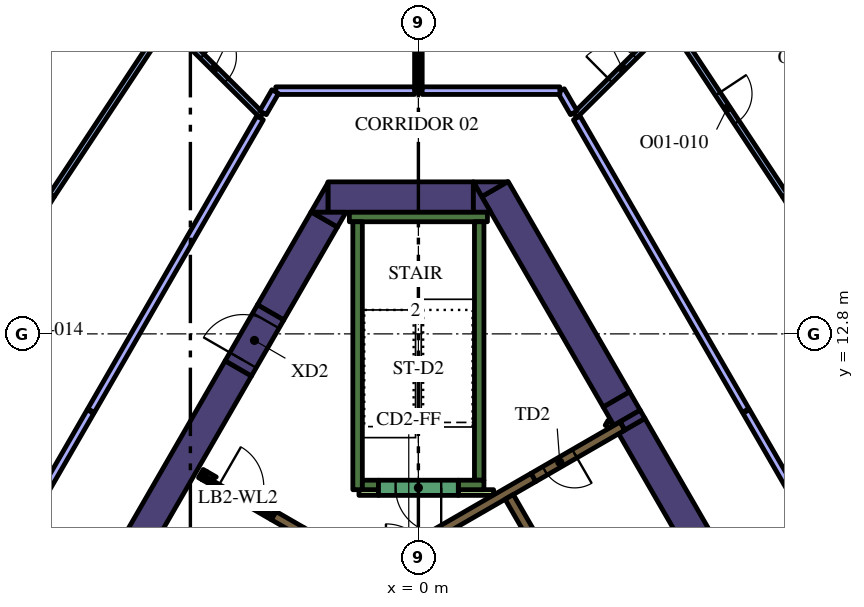
"""IFC4 building model, lengths in metres.
Left out: names, types, materials, properties, quantities, classifications, styles, units other than length and angle.
Written with IfcOpenShell. Run it as: python <this file> out.ifc"""

import sys

from ifc_helpers import new_model, si_unit, direction, frame, frame_2d, origin, place, context, subcontext, project, spatial, polyline, rectangle, outline, extrude, element, fill, save


model = new_model("IFC4")
c1 = context("Model", 3, precision=1e-05, world=origin(), true_north=direction((0.0, 1.0)))
c2 = subcontext(c1, "Body", "Model", "MODEL_VIEW")
j1 = project(units=[si_unit("LENGTHUNIT", "METRE"), si_unit("PLANEANGLEUNIT", "RADIAN")], contexts=[c1])
p1 = place(None, origin())
s1 = spatial("IfcSite", under=j1, at=p1, CompositionType="ELEMENT")
p2 = place(p1, origin())
s2 = spatial("IfcBuilding", under=s1, at=p2, CompositionType="ELEMENT")
p3 = place(p2, frame((0.0, 0.0, 145.8)))
s3 = spatial("IfcBuildingStorey", under=s2, at=p3, CompositionType="ELEMENT", Elevation=145.8)
p4 = place(p3, frame((5.489, 10.594, 0.0), z_axis=(0.0, 0.0, 1.0), x_axis=(-0.500000383388, 0.866025182435, 0.0)))
e1 = element("IfcWall", 1, at=p4, inside=s3, PredefinedType="SOLIDWALL", context=c2, shape_type="SweptSolid", body=[
    extrude(rectangle(XDim=0.558, YDim=0.8, at=frame_2d((0.279, 0.0))), origin(), (0.0, 0.0, 1.0), 4.2),
])
p5 = place(p3, frame((5.615, 10.375, 0.0), z_axis=(0.0, 0.0, 1.0), x_axis=(0.500002746266, -0.866023818221, 0.0)))
e2 = element("IfcWall", 2, at=p5, inside=s3, PredefinedType="SOLIDWALL", context=c2, shape_type="SweptSolid", body=[
    extrude(rectangle(XDim=5.328, YDim=0.8, at=frame_2d((2.664, 0.0))), origin(), (0.0, 0.0, 1.0), 4.2),
])
p6 = place(p3, origin())
e3 = element("IfcWall", 3, at=p6, inside=s3, PredefinedType="SOLIDWALL", context=c2, shape_type="SweptSolid", body=[
    extrude(outline(polyline([(5.432, 10.272), (5.308, 10.487), (5.836, 10.792), (5.96, 10.577), (5.432, 10.272)])), origin(), (0.0, 0.0, 1.0), 4.2),
])
p7 = place(p3, frame((5.209, 11.078, 0.0), z_axis=(0.0, 0.0, 1.0), x_axis=(-0.500035624827, 0.866004834804, 0.0)))
e4 = element("IfcWall", 4, at=p7, inside=s3, PredefinedType="SOLIDWALL", context=c2, shape_type="SweptSolid", body=[
    extrude(rectangle(XDim=6.388, YDim=0.8, at=frame_2d((3.194, 0.0))), origin(), (0.0, 0.0, 1.0), 4.2),
])
e5 = element("IfcWall", 5, at=p6, inside=s3, PredefinedType="SOLIDWALL", context=c2, shape_type="SweptSolid", body=[
    extrude(outline(polyline([(1.443, 16.8), (2.339, 16.8), (1.667, 16.412), (1.443, 16.8)])), origin(), (0.0, 0.0, 1.0), 4.2),
])
p8 = place(p3, frame((-2.379, 16.4, 0.0), z_axis=(0.0, 0.0, 1.0), x_axis=(1.0, 0.0, 0.0)))
e6 = element("IfcWall", 6, at=p8, inside=s3, PredefinedType="SOLIDWALL", context=c2, shape_type="SweptSolid", body=[
    extrude(rectangle(XDim=3.824, YDim=0.8, at=frame_2d((1.912, 0.0))), origin(), (0.0, 0.0, 1.0), 4.2),
])
e7 = element("IfcWall", 7, at=p6, inside=s3, PredefinedType="SOLIDWALL", context=c2, shape_type="SweptSolid", body=[
    extrude(outline(polyline([(1.905, 16.0), (1.447, 16.0), (1.447, 16.793), (1.905, 16.0)])), origin(), (0.0, 0.0, 1.0), 4.2),
])
e8 = element("IfcWall", 8, at=p6, inside=s3, PredefinedType="SOLIDWALL", context=c2, shape_type="SweptSolid", body=[
    extrude(outline(polyline([(-2.829, 16.0), (-2.381, 16.776), (-2.381, 16.0), (-2.829, 16.0)])), origin(), (0.0, 0.0, 1.0), 4.2),
])
p9 = place(p3, frame((-2.477, 15.81, 0.0), z_axis=(0.0, 0.0, 1.0), x_axis=(-0.499969377405, -0.866043083026, 0.0)))
e9 = element("IfcWall", 9, at=p9, inside=s3, PredefinedType="SOLIDWALL", context=c2, shape_type="SweptSolid", body=[
    extrude(rectangle(XDim=2.824, YDim=0.8, at=frame_2d((1.412, 0.0))), origin(), (0.0, 0.0, 1.0), 4.2),
])
e10 = element("IfcWall", 10, at=p6, inside=s3, PredefinedType="SOLIDWALL", context=c2, shape_type="SweptSolid", body=[
    extrude(outline(polyline([(-1.905, 16.0), (-2.129, 15.612), (-2.801, 16.0), (-1.905, 16.0)])), origin(), (0.0, 0.0, 1.0), 4.2),
])
p10 = place(p3, frame((-12.668, -1.842, 0.0), z_axis=(0.0, 0.0, 1.0), x_axis=(0.500003640647, 0.866023301845, 0.0)))
e11 = element("IfcWall", 11, at=p10, inside=s3, PredefinedType="SOLIDWALL", context=c2, shape_type="SweptSolid", body=[
    extrude(rectangle(XDim=15.858, YDim=0.8, at=frame_2d((7.929, 0.0))), origin(), (0.0, 0.0, 1.0), 4.2),
])
p11 = place(p3, frame((-1.817, 15.875, 0.0), z_axis=(0.0, 0.0, 1.0), x_axis=(1.0, 0.0, 0.0)))
e12 = element("IfcWall", 12, at=p11, inside=s3, PredefinedType="SOLIDWALL", context=c2, shape_type="SweptSolid", body=[
    extrude(rectangle(XDim=3.634, YDim=0.25, at=frame_2d((1.817, 0.0))), origin(), (0.0, 0.0, 1.0), 4.2),
])
p12 = place(p3, frame((1.6, 8.95, 0.0), z_axis=(0.0, 0.0, 1.0), x_axis=(0.0, 1.0, 0.0)))
e13 = element("IfcWall", 13, at=p12, inside=s3, PredefinedType="SOLIDWALL", context=c2, shape_type="SweptSolid", body=[
    extrude(rectangle(XDim=6.8, YDim=0.25, at=frame_2d((3.4, 0.0))), origin(), (0.0, 0.0, 1.0), 4.2),
])
p13 = place(p3, frame((1.05, 8.825, 0.0), z_axis=(0.0, 0.0, 1.0), x_axis=(1.0, 0.0, 0.0)))
e14 = element("IfcWall", 14, at=p13, inside=s3, PredefinedType="SOLIDWALL", context=c2, shape_type="SweptSolid", body=[
    extrude(rectangle(XDim=0.675, YDim=0.25, at=frame_2d((0.337, 0.0))), origin(), (0.0, 0.0, 1.0), 4.2),
])
p14 = place(p3, frame((-1.6, 8.7, 0.0), z_axis=(0.0, 0.0, 1.0), x_axis=(0.0, 1.0, 0.0)))
e15 = element("IfcWall", 15, at=p14, inside=s3, PredefinedType="SOLIDWALL", context=c2, shape_type="SweptSolid", body=[
    extrude(rectangle(XDim=7.05, YDim=0.25, at=frame_2d((3.525, 0.0))), origin(), (0.0, 0.0, 1.0), 4.2),
])
p15 = place(p3, frame((-1.475, 8.825, 0.0), z_axis=(0.0, 0.0, 1.0), x_axis=(1.0, 0.0, 0.0)))
e16 = element("IfcWall", 16, at=p15, inside=s3, PredefinedType="SOLIDWALL", context=c2, shape_type="SweptSolid", body=[
    extrude(rectangle(XDim=0.425, YDim=0.25, at=frame_2d((0.212, 0.0))), origin(), (0.0, 0.0, 1.0), 4.2),
])
p16 = place(p3, frame((3.028, 9.023, 0.0), z_axis=(0.0, 0.0, 1.0), x_axis=(-0.866036587186, -0.49998062928, 0.0)))
e17 = element("IfcWall", 17, at=p16, inside=s3, PredefinedType="SOLIDWALL", context=c2, shape_type="SweptSolid", body=[
    extrude(rectangle(XDim=3.384, YDim=0.25, at=frame_2d((1.692, 0.0))), origin(), (0.0, 0.0, 1.0), 4.2),
])
p17 = place(p3, frame((-5.725, 9.125, 0.0), z_axis=(0.0, 0.0, 1.0), x_axis=(0.866185586049, -0.49972245349, 0.0)))
e18 = element("IfcWall", 18, at=p17, inside=s3, PredefinedType="SOLIDWALL", context=c2, shape_type="SweptSolid", body=[
    extrude(rectangle(XDim=0.11, YDim=0.25, at=frame_2d((0.055, 0.0))), origin(), (0.0, 0.0, 1.0), 4.2),
])
p18 = place(p3, frame((-3.066, 7.59, 0.0), z_axis=(0.0, 0.0, 1.0), x_axis=(-0.866081358704, 0.49990307071, 0.0)))
e19 = element("IfcWall", 19, at=p18, inside=s3, PredefinedType="SOLIDWALL", context=c2, shape_type="SweptSolid", body=[
    extrude(rectangle(XDim=0.858, YDim=0.25, at=frame_2d((0.429, 0.0))), origin(), (0.0, 0.0, 1.0), 4.2),
])
e20 = element("IfcWall", 20, at=p6, inside=s3, PredefinedType="SOLIDWALL", context=c2, shape_type="SweptSolid", body=[
    extrude(outline(polyline([(-3.748, 8.128), (-3.813, 8.015), (-4.027, 8.139), (-4.017, 8.156), (-4.008, 8.173), (-4.0, 8.192), (-3.995, 8.21), (-3.991, 8.23), (-3.99, 8.25), (-3.99, 8.268), (-3.748, 8.128)])), origin(), (0.0, 0.0, 1.0), 4.2),
])
e21 = element("IfcWall", 21, at=p6, inside=s3, PredefinedType="SOLIDWALL", context=c2, shape_type="SweptSolid", body=[
    extrude(outline(polyline([(-5.689, 8.96), (-5.69, 8.961), (-5.565, 9.177), (-5.319, 9.035), (-5.335, 9.026), (-5.351, 9.015), (-5.366, 9.002), (-5.379, 8.988), (-5.392, 8.972), (-5.402, 8.956), (-5.412, 8.939), (-5.629, 9.064), (-5.629, 9.064), (-5.689, 8.96)])), origin(), (0.0, 0.0, 1.0), 4.2),
])
p19 = place(p3, frame((1.05, 8.625, 0.0), z_axis=(0.0, 0.0, 1.0), x_axis=(1.0, 0.0, 0.0)))
e22 = element("IfcWall", 22, at=p19, inside=s3, PredefinedType="PARTITIONING", context=c2, shape_type="SweptSolid", body=[
    extrude(rectangle(XDim=0.929, YDim=0.15, at=frame_2d((0.464, 0.0))), origin(), (0.0, 0.0, 1.0), 3.15),
])
p20 = place(p3, frame((-1.564, 8.625, 0.0), z_axis=(0.0, 0.0, 1.0), x_axis=(1.0, 0.0, 0.0)))
e23 = element("IfcWall", 23, at=p20, inside=s3, PredefinedType="PARTITIONING", context=c2, shape_type="SweptSolid", body=[
    extrude(rectangle(XDim=0.514, YDim=0.15, at=frame_2d((0.257, 0.0))), origin(), (0.0, 0.0, 1.0), 3.15),
])
p21 = place(p3, frame((4.98, 10.358, 0.0), z_axis=(0.0, 0.0, 1.0), x_axis=(0.500640202437, 0.86565546709, 0.0)))
e24 = element("IfcWall", 24, at=p21, inside=s3, PredefinedType="PARTITIONING", context=c2, shape_type="SweptSolid", body=[
    extrude(rectangle(XDim=0.146, YDim=0.15, at=frame_2d((0.073, 0.0))), origin(), (0.0, 0.0, 1.0), 3.15),
])
p22 = place(p3, frame((8.565, -2.185, 0.0), z_axis=(0.0, 0.0, 1.0), x_axis=(-0.499997954832, 0.866026584559, 0.0)))
e25 = element("IfcWall", 25, at=p22, inside=s3, PredefinedType="SOLIDWALL", context=c2, shape_type="SweptSolid", body=[
    extrude(rectangle(XDim=12.35, YDim=0.25, at=frame_2d((6.175, 0.0))), origin(), (0.0, 0.0, 1.0), 4.2),
])
p23 = place(p22, frame((0.585, 0.0, 0.0)))
e26 = element("IfcOpeningElement", 26, at=p23, cuts=e25, PredefinedType="OPENING", context=c2, shape_type="SweptSolid", body=[
    extrude(rectangle(XDim=1.1, YDim=2.1, at=frame_2d((0.55, 1.05))), frame((0.0, 0.135, 0.0), z_axis=(0.0, -1.0, 0.0), x_axis=(1.0, 0.0, 0.0)), (0.0, 0.0, 1.0), 0.27),
])
p24 = place(p3, frame((1.05, 8.75, 0.0), z_axis=(0.0, 0.0, 1.0), x_axis=(-1.0, 0.0, 0.0)))
e27 = element("IfcWall", 27, at=p24, inside=s3, PredefinedType="SOLIDWALL", context=c2, shape_type="SweptSolid", body=[
    extrude(rectangle(XDim=2.1, YDim=0.4, at=frame_2d((1.05, 0.0))), origin(), (0.0, 0.0, 1.0), 4.2),
])
p25 = place(p24, frame((0.45, 0.0, 0.0)))
e28 = element("IfcOpeningElement", 28, at=p25, cuts=e27, PredefinedType="OPENING", context=c2, shape_type="SweptSolid", body=[
    extrude(rectangle(XDim=1.2, YDim=2.1, at=frame_2d((0.6, 1.05))), frame((0.0, 0.21, 0.0), z_axis=(0.0, -1.0, 0.0), x_axis=(1.0, 0.0, 0.0)), (0.0, 0.0, 1.0), 0.42),
])
p26 = place(p3, frame((5.366, 10.373, 0.0), z_axis=(0.0, 0.0, 1.0), x_axis=(-0.866019956843, -0.50000943426, 0.0)))
e29 = element("IfcWall", 29, at=p26, inside=s3, PredefinedType="SOLIDWALL", context=c2, shape_type="SweptSolid", body=[
    extrude(rectangle(XDim=2.7, YDim=0.25, at=frame_2d((1.35, 0.0))), origin(), (0.0, 0.0, 1.0), 4.2),
])
p27 = place(p26, frame((1.45, 0.0, 0.0)))
e30 = element("IfcOpeningElement", 30, at=p27, cuts=e29, PredefinedType="OPENING", context=c2, shape_type="SweptSolid", body=[
    extrude(rectangle(XDim=0.9, YDim=2.1, at=frame_2d((0.45, 1.05))), frame((0.0, 0.135, 0.0), z_axis=(0.0, -1.0, 0.0), x_axis=(1.0, 0.0, 0.0)), (0.0, 0.0, 1.0), 0.27),
])
p28 = place(p3, frame((-5.659, 9.012, 0.0), z_axis=(0.0, 0.0, 1.0), x_axis=(0.866009402589, -0.500027713859, 0.0)))
e31 = element("IfcWall", 31, at=p28, inside=s3, PredefinedType="PARTITIONING", context=c2, shape_type="SweptSolid", body=[
    extrude(rectangle(XDim=2.1, YDim=0.12, at=frame_2d((1.05, 0.0))), origin(), (0.0, 0.0, 1.0), 3.15),
])
p29 = place(p28, frame((0.45, 0.0, 0.0)))
e32 = element("IfcOpeningElement", 32, at=p29, cuts=e31, PredefinedType="OPENING", context=c2, shape_type="SweptSolid", body=[
    extrude(rectangle(XDim=1.2, YDim=2.1, at=frame_2d((0.6, 1.05))), frame((0.0, 0.07, 0.0), z_axis=(0.0, -1.0, 0.0), x_axis=(1.0, 0.0, 0.0)), (0.0, 0.0, 1.0), 0.14),
])
p30 = place(p3, frame((-4.739, 11.892, 0.0), z_axis=(0.0, 0.0, 1.0), x_axis=(0.500062241894, 0.865989465428, 0.0)))
e33 = element("IfcWall", 33, at=p30, inside=s3, PredefinedType="SOLIDWALL", context=c2, shape_type="SweptSolid", body=[
    extrude(rectangle(XDim=1.7, YDim=0.8, at=frame_2d((0.85, 0.0))), origin(), (0.0, 0.0, 1.0), 4.2),
])
p31 = place(p30, frame((0.25, 0.0, 0.0)))
e34 = element("IfcOpeningElement", 34, at=p31, cuts=e33, PredefinedType="OPENING", context=c2, shape_type="SweptSolid", body=[
    extrude(rectangle(XDim=1.2, YDim=2.1, at=frame_2d((0.6, 1.05))), frame((0.0, 0.41, 0.0), z_axis=(0.0, -1.0, 0.0), x_axis=(1.0, 0.0, 0.0)), (0.0, 0.0, 1.0), 0.82),
])
p32 = place(p3, frame((11.19, 13.951, 0.0), z_axis=(0.0, 0.0, 1.0), x_axis=(-0.526165616903, 0.850382116221, 0.0)))
e35 = element("IfcWall", 35, at=p32, inside=s3, PredefinedType="PARTITIONING", context=c2, shape_type="SweptSolid", body=[
    extrude(rectangle(XDim=2.935, YDim=0.15, at=frame_2d((1.468, 0.0))), origin(), (0.0, 0.0, 1.0), 3.15),
])
p33 = place(p3, frame((6.616, 21.024, 0.0), z_axis=(0.0, 0.0, 1.0), x_axis=(0.551915124006, -0.833900291338, 0.0)))
e36 = element("IfcWall", 36, at=p33, inside=s3, PredefinedType="PARTITIONING", context=c2, shape_type="SweptSolid", body=[
    extrude(rectangle(XDim=5.488, YDim=0.15, at=frame_2d((2.744, 0.0))), origin(), (0.0, 0.0, 1.0), 3.15),
])
p34 = place(p33, frame((2.288, 0.0, 0.0)))
e37 = element("IfcOpeningElement", 37, at=p34, cuts=e36, PredefinedType="OPENING", context=c2, shape_type="SweptSolid", body=[
    extrude(rectangle(XDim=0.9, YDim=2.1, at=frame_2d((0.45, 1.05))), frame((0.0, 0.085, 0.0), z_axis=(0.0, -1.0, 0.0), x_axis=(1.0, 0.0, 0.0)), (0.0, 0.0, 1.0), 0.17),
])
p35 = place(p3, frame((4.128, 18.55, 0.0), z_axis=(0.0, 0.0, 1.0), x_axis=(0.709237676072, 0.704969445324, 0.0)))
e38 = element("IfcWall", 38, at=p35, inside=s3, PredefinedType="PARTITIONING", context=c2, shape_type="SweptSolid", body=[
    extrude(rectangle(XDim=3.432, YDim=0.15, at=frame_2d((1.716, 0.0))), origin(), (0.0, 0.0, 1.0), 3.15),
])
p36 = place(p35, frame((1.3, 0.0, 0.0)))
e39 = element("IfcOpeningElement", 39, at=p36, cuts=e38, PredefinedType="OPENING", context=c2, shape_type="SweptSolid", body=[
    extrude(rectangle(XDim=0.9, YDim=2.1, at=frame_2d((0.45, 1.05))), frame((0.0, 0.085, 0.0), z_axis=(0.0, -1.0, 0.0), x_axis=(1.0, 0.0, 0.0)), (0.0, 0.0, 1.0), 0.17),
])
p37 = place(p3, frame((13.63, 2.091, 0.0), z_axis=(0.0, 0.0, 1.0), x_axis=(-0.499990634175, 0.866030811078, 0.0)))
e40 = element("IfcWall", 40, at=p37, inside=s3, PredefinedType="PARTITIONING", context=c2, shape_type="SweptSolid", body=[
    extrude(rectangle(XDim=10.008, YDim=0.2, at=frame_2d((5.004, 0.0))), origin(), (0.0, 0.0, 1.0), 3.15),
])
p38 = place(p37, frame((4.5, 0.0, 0.0)))
e41 = element("IfcOpeningElement", 41, at=p38, cuts=e40, PredefinedType="OPENING", context=c2, shape_type="SweptSolid", body=[
    extrude(rectangle(XDim=1.0, YDim=2.1, at=frame_2d((0.5, 1.05))), frame((0.0, 0.11, 0.0), z_axis=(0.0, -1.0, 0.0), x_axis=(1.0, 0.0, 0.0)), (0.0, 0.0, 1.0), 0.22),
])
p39 = place(p3, frame((8.611, 10.785, 0.0), z_axis=(0.0, 0.0, 1.0), x_axis=(-0.499987928593, 0.866032373102, 0.0)))
e42 = element("IfcWall", 42, at=p39, inside=s3, PredefinedType="PARTITIONING", context=c2, shape_type="SweptSolid", body=[
    extrude(rectangle(XDim=8.889, YDim=0.2, at=frame_2d((4.445, 0.0))), origin(), (0.0, 0.0, 1.0), 3.15),
])
p40 = place(p3, frame((0.0, 19.2, 0.0), z_axis=(0.0, 0.0, 1.0), x_axis=(0.0, 1.0, 0.0)))
e43 = element("IfcWall", 43, at=p40, inside=s3, PredefinedType="PARTITIONING", context=c2, shape_type="SweptSolid", body=[
    extrude(rectangle(XDim=10.154, YDim=0.2, at=frame_2d((5.077, 0.0))), origin(), (0.0, 0.0, 1.0), 3.15),
])
p41 = place(p3, frame((4.089, 18.617, 0.0), z_axis=(0.0, 0.0, 1.0), x_axis=(-0.500120377296, 0.865955892764, 0.0)))
e44 = element("IfcWall", 44, at=p41, inside=s3, PredefinedType="PARTITIONING", context=c2, shape_type="SweptSolid", body=[
    extrude(rectangle(XDim=0.673, YDim=0.2, at=frame_2d((0.336, 0.0))), origin(), (0.0, 0.0, 1.0), 3.15),
])
p42 = place(p3, frame((3.723, 19.2, 0.0), z_axis=(0.0, 0.0, 1.0), x_axis=(-1.0, 0.0, 0.0)))
e45 = element("IfcWall", 45, at=p42, inside=s3, PredefinedType="PARTITIONING", context=c2, shape_type="SweptSolid", body=[
    extrude(rectangle(XDim=3.623, YDim=0.2, at=frame_2d((1.812, 0.0))), origin(), (0.0, 0.0, 1.0), 3.15),
])
p43 = place(p3, frame((-6.619, 21.027, 0.0), z_axis=(0.0, 0.0, 1.0), x_axis=(0.709188943058, -0.705018470002, 0.0)))
e46 = element("IfcWall", 46, at=p43, inside=s3, PredefinedType="PARTITIONING", context=c2, shape_type="SweptSolid", body=[
    extrude(rectangle(XDim=3.512, YDim=0.15, at=frame_2d((1.756, 0.0))), origin(), (0.0, 0.0, 1.0), 3.15),
])
p44 = place(p43, frame((1.312, 0.0, 0.0)))
e47 = element("IfcOpeningElement", 47, at=p44, cuts=e46, PredefinedType="OPENING", context=c2, shape_type="SweptSolid", body=[
    extrude(rectangle(XDim=0.9, YDim=2.1, at=frame_2d((0.45, 1.05))), frame((0.0, 0.085, 0.0), z_axis=(0.0, -1.0, 0.0), x_axis=(1.0, 0.0, 0.0)), (0.0, 0.0, 1.0), 0.17),
])
p45 = place(p3, frame((-0.1, 19.2, 0.0), z_axis=(0.0, 0.0, 1.0), x_axis=(-1.0, 0.0, 0.0)))
e48 = element("IfcWall", 48, at=p45, inside=s3, PredefinedType="PARTITIONING", context=c2, shape_type="SweptSolid", body=[
    extrude(rectangle(XDim=3.653, YDim=0.2, at=frame_2d((1.826, 0.0))), origin(), (0.0, 0.0, 1.0), 3.15),
])
p46 = place(p3, frame((-3.768, 19.174, 0.0), z_axis=(0.0, 0.0, 1.0), x_axis=(-0.499897828833, -0.8660843843, 0.0)))
e49 = element("IfcWall", 49, at=p46, inside=s3, PredefinedType="PARTITIONING", context=c2, shape_type="SweptSolid", body=[
    extrude(rectangle(XDim=0.643, YDim=0.2, at=frame_2d((0.321, 0.0))), origin(), (0.0, 0.0, 1.0), 3.15),
])
p47 = place(p3, frame((-6.658, 20.96, 0.0), z_axis=(0.0, 0.0, 1.0), x_axis=(-0.551907039463, -0.833905642019, 0.0)))
e50 = element("IfcWall", 50, at=p47, inside=s3, PredefinedType="PARTITIONING", context=c2, shape_type="SweptSolid", body=[
    extrude(rectangle(XDim=5.412, YDim=0.15, at=frame_2d((2.706, 0.0))), origin(), (0.0, 0.0, 1.0), 3.15),
])
p48 = place(p3, frame((-12.877, 11.224, 0.0), z_axis=(0.0, 0.0, 1.0), x_axis=(0.526202711334, 0.850359163286, 0.0)))
e51 = element("IfcWall", 51, at=p48, inside=s3, PredefinedType="PARTITIONING", context=c2, shape_type="SweptSolid", body=[
    extrude(rectangle(XDim=6.142, YDim=0.15, at=frame_2d((3.071, 0.0))), origin(), (0.0, 0.0, 1.0), 3.15),
])
p49 = place(p48, frame((2.642, 0.0, 0.0)))
e52 = element("IfcOpeningElement", 52, at=p49, cuts=e51, PredefinedType="OPENING", context=c2, shape_type="SweptSolid", body=[
    extrude(rectangle(XDim=0.9, YDim=2.1, at=frame_2d((0.45, 1.05))), frame((0.0, 0.085, 0.0), z_axis=(0.0, -1.0, 0.0), x_axis=(1.0, 0.0, 0.0)), (0.0, 0.0, 1.0), 0.17),
])
p50 = place(p3, frame((-8.628, 10.755, 0.0), z_axis=(0.0, 0.0, 1.0), x_axis=(-0.500004234368, -0.866022959057, 0.0)))
e53 = element("IfcWall", 53, at=p50, inside=s3, PredefinedType="PARTITIONING", context=c2, shape_type="SweptSolid", body=[
    extrude(rectangle(XDim=10.0, YDim=0.2, at=frame_2d((5.0, 0.0))), origin(), (0.0, 0.0, 1.0), 3.15),
])
p51 = place(p50, frame((4.5, 0.0, 0.0)))
e54 = element("IfcOpeningElement", 54, at=p51, cuts=e53, PredefinedType="OPENING", context=c2, shape_type="SweptSolid", body=[
    extrude(rectangle(XDim=1.0, YDim=2.1, at=frame_2d((0.5, 1.05))), frame((0.0, 0.11, 0.0), z_axis=(0.0, -1.0, 0.0), x_axis=(1.0, 0.0, 0.0)), (0.0, 0.0, 1.0), 0.22),
])
p52 = place(p3, frame((-4.167, 18.483, 0.0), z_axis=(0.0, 0.0, 1.0), x_axis=(-0.499974340325, -0.866040217898, 0.0)))
e55 = element("IfcWall", 55, at=p52, inside=s3, PredefinedType="PARTITIONING", context=c2, shape_type="SweptSolid", body=[
    extrude(rectangle(XDim=8.894, YDim=0.2, at=frame_2d((4.447, 0.0))), origin(), (0.0, 0.0, 1.0), 3.15),
])
p53 = place(p25, origin())
e56 = element("IfcDoor", 56, at=p53, inside=s3, OperationType="SINGLE_SWING_LEFT", PredefinedType="DOOR", context=c2, shape_type="SweptSolid", body=[
    extrude(rectangle(XDim=1.2, YDim=2.1, at=frame_2d((0.6, 1.05))), frame((0.0, 0.025, 0.0), z_axis=(0.0, -1.0, 0.0), x_axis=(1.0, 0.0, 0.0)), (0.0, 0.0, 1.0), 0.05),
])
fill(e28, e56)
p54 = place(p27, origin())
e57 = element("IfcDoor", 57, at=p54, inside=s3, OperationType="SINGLE_SWING_LEFT", PredefinedType="DOOR", context=c2, shape_type="SweptSolid", body=[
    extrude(rectangle(XDim=0.9, YDim=2.1, at=frame_2d((0.45, 1.05))), frame((0.0, 0.025, 0.0), z_axis=(0.0, -1.0, 0.0), x_axis=(1.0, 0.0, 0.0)), (0.0, 0.0, 1.0), 0.05),
])
fill(e30, e57)
p55 = place(p29, origin())
e58 = element("IfcDoor", 58, at=p55, inside=s3, OperationType="SINGLE_SWING_LEFT", PredefinedType="DOOR", context=c2, shape_type="SweptSolid", body=[
    extrude(rectangle(XDim=1.2, YDim=2.1, at=frame_2d((0.6, 1.05))), frame((0.0, 0.025, 0.0), z_axis=(0.0, -1.0, 0.0), x_axis=(1.0, 0.0, 0.0)), (0.0, 0.0, 1.0), 0.05),
])
fill(e32, e58)
p56 = place(p31, origin())
e59 = element("IfcDoor", 59, at=p56, inside=s3, OperationType="SINGLE_SWING_LEFT", PredefinedType="DOOR", context=c2, shape_type="SweptSolid", body=[
    extrude(rectangle(XDim=1.2, YDim=2.1, at=frame_2d((0.6, 1.05))), frame((0.0, 0.025, 0.0), z_axis=(0.0, -1.0, 0.0), x_axis=(1.0, 0.0, 0.0)), (0.0, 0.0, 1.0), 0.05),
])
fill(e34, e59)
p57 = place(p34, origin())
e60 = element("IfcDoor", 60, at=p57, inside=s3, OperationType="SINGLE_SWING_LEFT", PredefinedType="DOOR", context=c2, shape_type="SweptSolid", body=[
    extrude(rectangle(XDim=0.9, YDim=2.1, at=frame_2d((0.45, 1.05))), frame((0.0, 0.025, 0.0), z_axis=(0.0, -1.0, 0.0), x_axis=(1.0, 0.0, 0.0)), (0.0, 0.0, 1.0), 0.05),
])
fill(e37, e60)
p58 = place(p36, origin())
e61 = element("IfcDoor", 61, at=p58, inside=s3, OperationType="SINGLE_SWING_RIGHT", PredefinedType="DOOR", context=c2, shape_type="SweptSolid", body=[
    extrude(rectangle(XDim=0.9, YDim=2.1, at=frame_2d((0.45, 1.05))), frame((0.0, 0.025, 0.0), z_axis=(0.0, -1.0, 0.0), x_axis=(1.0, 0.0, 0.0)), (0.0, 0.0, 1.0), 0.05),
])
fill(e39, e61)
p59 = place(p44, origin())
e62 = element("IfcDoor", 62, at=p59, inside=s3, OperationType="SINGLE_SWING_RIGHT", PredefinedType="DOOR", context=c2, shape_type="SweptSolid", body=[
    extrude(rectangle(XDim=0.9, YDim=2.1, at=frame_2d((0.45, 1.05))), frame((0.0, 0.025, 0.0), z_axis=(0.0, -1.0, 0.0), x_axis=(1.0, 0.0, 0.0)), (0.0, 0.0, 1.0), 0.05),
])
fill(e47, e62)
save(model, sys.argv[1])
